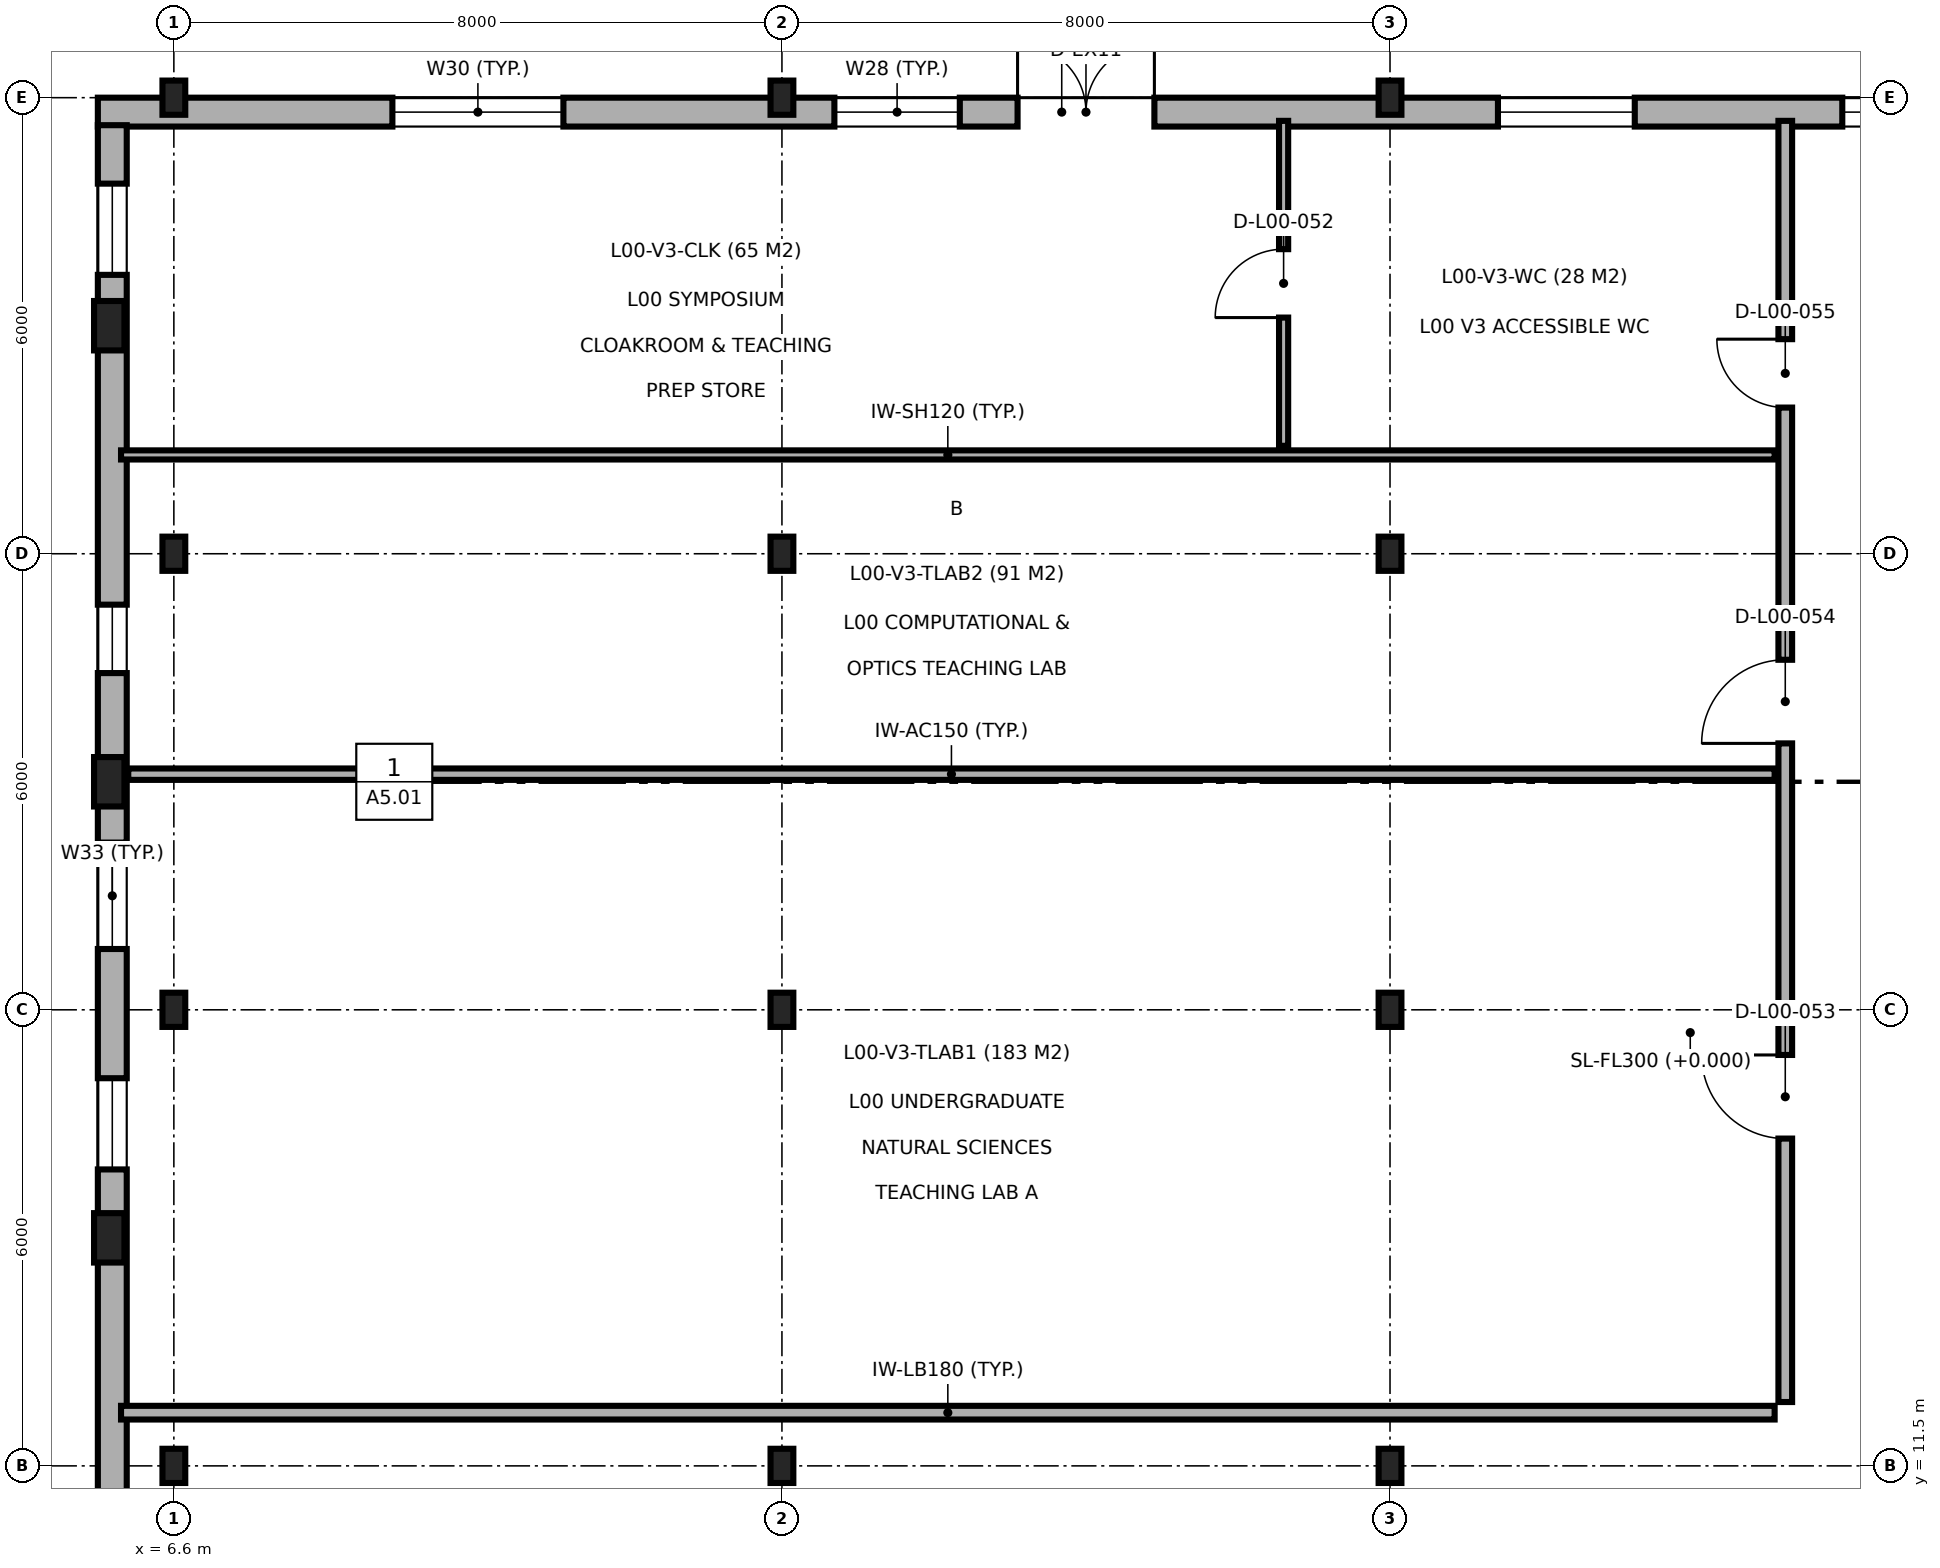
"""IFC4 building model, lengths in metres.
Left out: names, types, materials, properties, quantities, classifications, styles, units other than length and angle.
Written with IfcOpenShell. Run it as: python <this file> out.ifc"""

import sys

from ifc_helpers import new_model, si_unit, direction, frame, frame_2d, origin, origin_2d, place, context, subcontext, project, spatial, rectangle, i_section, extrude, element, fill, save


model = new_model("IFC4")
c1 = context("Model", 3, precision=1e-05, world=origin(), true_north=direction((0.0, 1.0)))
c2 = subcontext(c1, "Body", "Model", "MODEL_VIEW")
j1 = project(units=[si_unit("LENGTHUNIT", "METRE"), si_unit("PLANEANGLEUNIT", "RADIAN")], contexts=[c1])
p1 = place(None, origin())
s1 = spatial("IfcSite", under=j1, at=p1, CompositionType="ELEMENT")
p2 = place(p1, origin())
s2 = spatial("IfcBuilding", under=s1, at=p2, CompositionType="ELEMENT")
p3 = place(p2, origin())
s3 = spatial("IfcBuildingStorey", under=s2, at=p3, CompositionType="ELEMENT", Elevation=0.0)
for number, where, z_axis, x_axis in (
    (1, (5.75, 14.5, 0.0), (0.0, 0.0, 1.0), (1.0, 0.0, 0.0)),
    (2, (5.75, 20.5, 0.0), (0.0, 0.0, 1.0), (1.0, 0.0, 0.0)),
    (3, (5.75, 26.5, 0.0), (0.0, 0.0, 1.0), (1.0, 0.0, 0.0)),
):
    element("IfcColumn", number, at=place(p3, frame(where, z_axis=z_axis, x_axis=x_axis)), inside=s3, PredefinedType="PILASTER", context=c2, shape_type="SweptSolid", body=[
        extrude(rectangle(XDim=0.4, YDim=0.65, at=origin_2d()), origin(), (0.0, 0.0, 1.0), 4.8),
    ])
for number, where, z_axis, x_axis in (
    (4, (6.6, 11.5, 0.0), (0.0, 0.0, 1.0), (1.0, 0.0, 0.0)),
    (5, (6.6, 17.5, 0.0), (0.0, 0.0, 1.0), (1.0, 0.0, 0.0)),
    (6, (6.6, 23.5, 0.0), (0.0, 0.0, 1.0), (1.0, 0.0, 0.0)),
    (7, (6.6, 29.5, 0.0), (0.0, 0.0, 1.0), (1.0, 0.0, 0.0)),
    (8, (14.6, 11.5, 0.0), (0.0, 0.0, 1.0), (1.0, 0.0, 0.0)),
    (9, (14.6, 17.5, 0.0), (0.0, 0.0, 1.0), (1.0, 0.0, 0.0)),
    (10, (14.6, 23.5, 0.0), (0.0, 0.0, 1.0), (1.0, 0.0, 0.0)),
    (11, (14.6, 29.5, 0.0), (0.0, 0.0, 1.0), (1.0, 0.0, 0.0)),
    (12, (22.6, 11.5, 0.0), (0.0, 0.0, 1.0), (1.0, 0.0, 0.0)),
    (13, (22.6, 17.5, 0.0), (0.0, 0.0, 1.0), (1.0, 0.0, 0.0)),
    (14, (22.6, 23.5, 0.0), (0.0, 0.0, 1.0), (1.0, 0.0, 0.0)),
    (15, (22.6, 29.5, 0.0), (0.0, 0.0, 1.0), (1.0, 0.0, 0.0)),
):
    element("IfcColumn", number, at=place(p3, frame(where, z_axis=z_axis, x_axis=x_axis)), inside=s3, PredefinedType="COLUMN", context=c2, shape_type="SweptSolid", body=[
        extrude(i_section(OverallWidth=0.3, OverallDepth=0.45, WebThickness=0.014, FlangeThickness=0.026, FilletRadius=0.027, at=origin_2d()), origin(), (0.0, 0.0, 1.0), 4.8),
    ])
p4 = place(p3, frame((30.962, 29.31, 0.0), z_axis=(0.0, 0.0, 1.0), x_axis=(-1.0, 0.0, 0.0)))
e16 = element("IfcWall", 16, at=p4, inside=s3, PredefinedType="SOLIDWALL", context=c2, shape_type="SweptSolid", body=[
    extrude(rectangle(XDim=25.362, YDim=0.38, at=frame_2d((12.681, 0.0))), origin(), (0.0, 0.0, 1.0), 4.55),
])
p5 = place(p4, frame((11.462, 0.0, 0.0)))
e17 = element("IfcOpeningElement", 17, at=p5, cuts=e16, PredefinedType="OPENING", context=c2, shape_type="SweptSolid", body=[
    extrude(rectangle(XDim=1.8, YDim=2.3, at=frame_2d((0.9, 1.15))), frame((0.0, 0.2, 0.0), z_axis=(0.0, -1.0, 0.0), x_axis=(1.0, 0.0, 0.0)), (0.0, 0.0, 1.0), 0.4),
])
p6 = place(p4, frame((1.512, 0.0, 0.9)))
e18 = element("IfcOpeningElement", 18, at=p6, cuts=e16, PredefinedType="OPENING", context=c2, shape_type="SweptSolid", body=[
    extrude(rectangle(XDim=0.9, YDim=1.8, at=frame_2d((0.45, 0.9))), frame((0.0, 0.2, 0.0), z_axis=(0.0, -1.0, 0.0), x_axis=(1.0, 0.0, 0.0)), (0.0, 0.0, 1.0), 0.4),
])
p7 = place(p4, frame((5.142, 0.0, 0.9)))
e19 = element("IfcOpeningElement", 19, at=p7, cuts=e16, PredefinedType="OPENING", context=c2, shape_type="SweptSolid", body=[
    extrude(rectangle(XDim=1.8, YDim=2.1, at=frame_2d((0.9, 1.05))), frame((0.0, 0.2, 0.0), z_axis=(0.0, -1.0, 0.0), x_axis=(1.0, 0.0, 0.0)), (0.0, 0.0, 1.0), 0.4),
])
p8 = place(p4, frame((14.022, 0.0, 0.9)))
e20 = element("IfcOpeningElement", 20, at=p8, cuts=e16, PredefinedType="OPENING", context=c2, shape_type="SweptSolid", body=[
    extrude(rectangle(XDim=1.65, YDim=1.95, at=frame_2d((0.825, 0.975))), frame((0.0, 0.2, 0.0), z_axis=(0.0, -1.0, 0.0), x_axis=(1.0, 0.0, 0.0)), (0.0, 0.0, 1.0), 0.4),
])
p9 = place(p4, frame((19.237, 0.0, 0.9)))
e21 = element("IfcOpeningElement", 21, at=p9, cuts=e16, PredefinedType="OPENING", context=c2, shape_type="SweptSolid", body=[
    extrude(rectangle(XDim=2.25, YDim=1.95, at=frame_2d((1.125, 0.975))), frame((0.0, 0.2, 0.0), z_axis=(0.0, -1.0, 0.0), x_axis=(1.0, 0.0, 0.0)), (0.0, 0.0, 1.0), 0.4),
])
p10 = place(p3, frame((5.79, 29.138, 0.0), z_axis=(0.0, 0.0, 1.0), x_axis=(0.0, -1.0, 0.0)))
e22 = element("IfcWall", 22, at=p10, inside=s3, PredefinedType="SOLIDWALL", context=c2, shape_type="SweptSolid", body=[
    extrude(rectangle(XDim=24.238, YDim=0.38, at=frame_2d((12.119, 0.0))), origin(), (0.0, 0.0, 1.0), 4.55),
])
p11 = place(p10, frame((0.769, 0.0, 0.9)))
e23 = element("IfcOpeningElement", 23, at=p11, cuts=e22, PredefinedType="OPENING", context=c2, shape_type="SweptSolid", body=[
    extrude(rectangle(XDim=1.2, YDim=1.8, at=frame_2d((0.6, 0.9))), frame((0.0, 0.2, 0.0), z_axis=(0.0, -1.0, 0.0), x_axis=(1.0, 0.0, 0.0)), (0.0, 0.0, 1.0), 0.4),
])
p12 = place(p10, frame((6.308, 0.0, 0.9)))
e24 = element("IfcOpeningElement", 24, at=p12, cuts=e22, PredefinedType="OPENING", context=c2, shape_type="SweptSolid", body=[
    extrude(rectangle(XDim=0.9, YDim=1.8, at=frame_2d((0.45, 0.9))), frame((0.0, 0.2, 0.0), z_axis=(0.0, -1.0, 0.0), x_axis=(1.0, 0.0, 0.0)), (0.0, 0.0, 1.0), 0.4),
])
p13 = place(p10, frame((9.438, 0.0, 0.9)))
e25 = element("IfcOpeningElement", 25, at=p13, cuts=e22, PredefinedType="OPENING", context=c2, shape_type="SweptSolid", body=[
    extrude(rectangle(XDim=1.4, YDim=1.65, at=frame_2d((0.7, 0.825))), frame((0.0, 0.2, 0.0), z_axis=(0.0, -1.0, 0.0), x_axis=(1.0, 0.0, 0.0)), (0.0, 0.0, 1.0), 0.4),
])
p14 = place(p10, frame((12.538, 0.0, 0.9)))
e26 = element("IfcOpeningElement", 26, at=p14, cuts=e22, PredefinedType="OPENING", context=c2, shape_type="SweptSolid", body=[
    extrude(rectangle(XDim=1.2, YDim=1.8, at=frame_2d((0.6, 0.9))), frame((0.0, 0.2, 0.0), z_axis=(0.0, -1.0, 0.0), x_axis=(1.0, 0.0, 0.0)), (0.0, 0.0, 1.0), 0.4),
])
p15 = place(p10, frame((18.538, 0.0, 0.9)))
e27 = element("IfcOpeningElement", 27, at=p15, cuts=e22, PredefinedType="OPENING", context=c2, shape_type="SweptSolid", body=[
    extrude(rectangle(XDim=1.2, YDim=1.8, at=frame_2d((0.6, 0.9))), frame((0.0, 0.2, 0.0), z_axis=(0.0, -1.0, 0.0), x_axis=(1.0, 0.0, 0.0)), (0.0, 0.0, 1.0), 0.4),
])
p16 = place(p10, frame((21.528, 0.0, 0.9)))
e28 = element("IfcOpeningElement", 28, at=p16, cuts=e22, PredefinedType="OPENING", context=c2, shape_type="SweptSolid", body=[
    extrude(rectangle(XDim=1.2, YDim=1.8, at=frame_2d((0.6, 0.9))), frame((0.0, 0.2, 0.0), z_axis=(0.0, -1.0, 0.0), x_axis=(1.0, 0.0, 0.0)), (0.0, 0.0, 1.0), 0.4),
])
p17 = place(p3, frame((5.905, 12.2, 0.0), z_axis=(0.0, 0.0, 1.0), x_axis=(1.0, 0.0, 0.0)))
e29 = element("IfcWall", 29, at=p17, inside=s3, PredefinedType="PARTITIONING", context=c2, shape_type="SweptSolid", body=[
    extrude(rectangle(XDim=21.755, YDim=0.18, at=frame_2d((10.877, 0.0))), origin(), (0.0, 0.0, 1.0), 4.55),
])
p18 = place(p3, frame((6.0, 20.6, 0.0), z_axis=(0.0, 0.0, 1.0), x_axis=(1.0, 0.0, 0.0)))
e30 = element("IfcWall", 30, at=p18, inside=s3, PredefinedType="PARTITIONING", context=c2, shape_type="SweptSolid", body=[
    extrude(rectangle(XDim=21.66, YDim=0.15, at=frame_2d((10.83, 0.0))), origin(), (0.0, 0.0, 1.0), 4.55),
])
p19 = place(p3, frame((5.905, 24.8, 0.0), z_axis=(0.0, 0.0, 1.0), x_axis=(1.0, 0.0, 0.0)))
e31 = element("IfcWall", 31, at=p19, inside=s3, PredefinedType="PARTITIONING", context=c2, shape_type="SweptSolid", body=[
    extrude(rectangle(XDim=21.755, YDim=0.12, at=frame_2d((10.877, 0.0))), origin(), (0.0, 0.0, 1.0), 4.55),
])
p20 = place(p3, frame((21.2, 24.92, 0.0), z_axis=(0.0, 0.0, 1.0), x_axis=(0.0, 1.0, 0.0)))
e32 = element("IfcWall", 32, at=p20, inside=s3, PredefinedType="PARTITIONING", context=c2, shape_type="SweptSolid", body=[
    extrude(rectangle(XDim=4.275, YDim=0.12, at=frame_2d((2.138, 0.0))), origin(), (0.0, 0.0, 1.0), 4.55),
])
p21 = place(p20, frame((1.687, 0.0, 0.0)))
e33 = element("IfcOpeningElement", 33, at=p21, cuts=e32, PredefinedType="OPENING", context=c2, shape_type="SweptSolid", body=[
    extrude(rectangle(XDim=0.9, YDim=2.1, at=frame_2d((0.45, 1.05))), frame((0.0, 0.07, 0.0), z_axis=(0.0, -1.0, 0.0), x_axis=(1.0, 0.0, 0.0)), (0.0, 0.0, 1.0), 0.14),
])
p22 = place(p3, frame((27.8, 12.34, 0.0), z_axis=(0.0, 0.0, 1.0), x_axis=(0.0, 1.0, 0.0)))
e34 = element("IfcWall", 34, at=p22, inside=s3, PredefinedType="PARTITIONING", context=c2, shape_type="SweptSolid", body=[
    extrude(rectangle(XDim=16.855, YDim=0.18, at=frame_2d((8.427, 0.0))), origin(), (0.0, 0.0, 1.0), 4.31),
])
p23 = place(p22, frame((3.466, 0.0, 0.0)))
e35 = element("IfcOpeningElement", 35, at=p23, cuts=e34, PredefinedType="OPENING", context=c2, shape_type="SweptSolid", body=[
    extrude(rectangle(XDim=1.1, YDim=2.15, at=frame_2d((0.55, 1.075))), frame((0.0, 0.1, 0.0), z_axis=(0.0, -1.0, 0.0), x_axis=(1.0, 0.0, 0.0)), (0.0, 0.0, 1.0), 0.2),
])
p24 = place(p22, frame((8.665, 0.0, 0.0)))
e36 = element("IfcOpeningElement", 36, at=p24, cuts=e34, PredefinedType="OPENING", context=c2, shape_type="SweptSolid", body=[
    extrude(rectangle(XDim=1.1, YDim=2.15, at=frame_2d((0.55, 1.075))), frame((0.0, 0.1, 0.0), z_axis=(0.0, -1.0, 0.0), x_axis=(1.0, 0.0, 0.0)), (0.0, 0.0, 1.0), 0.2),
])
p25 = place(p22, frame((13.083, 0.0, 0.0)))
e37 = element("IfcOpeningElement", 37, at=p25, cuts=e34, PredefinedType="OPENING", context=c2, shape_type="SweptSolid", body=[
    extrude(rectangle(XDim=0.9, YDim=2.1, at=frame_2d((0.45, 1.05))), frame((0.0, 0.1, 0.0), z_axis=(0.0, -1.0, 0.0), x_axis=(1.0, 0.0, 0.0)), (0.0, 0.0, 1.0), 0.2),
])
p26 = place(p5, frame((1.8, 0.0, 0.0), z_axis=(0.0, 0.0, 1.0), x_axis=(-1.0, 0.0, 0.0)))
e38 = element("IfcDoor", 38, at=p26, inside=s3, OperationType="DOUBLE_DOOR_SINGLE_SWING", PredefinedType="DOOR", context=c2, shape_type="SweptSolid", body=[
    extrude(rectangle(XDim=1.8, YDim=2.3, at=frame_2d((0.9, 1.15))), frame((0.0, 0.025, 0.0), z_axis=(0.0, -1.0, 0.0), x_axis=(1.0, 0.0, 0.0)), (0.0, 0.0, 1.0), 0.05),
])
fill(e17, e38)
p27 = place(p6, origin())
e39 = element("IfcWindow", 39, at=p27, inside=s3, PartitioningType="SINGLE_PANEL", PredefinedType="WINDOW", context=c2, shape_type="SweptSolid", body=[
    extrude(rectangle(XDim=0.9, YDim=1.8, at=frame_2d((0.45, 0.9))), frame((0.0, 0.03, 0.0), z_axis=(0.0, -1.0, 0.0), x_axis=(1.0, 0.0, 0.0)), (0.0, 0.0, 1.0), 0.06),
])
fill(e18, e39)
p28 = place(p7, origin())
e40 = element("IfcWindow", 40, at=p28, inside=s3, PartitioningType="SINGLE_PANEL", PredefinedType="WINDOW", context=c2, shape_type="SweptSolid", body=[
    extrude(rectangle(XDim=1.8, YDim=2.1, at=frame_2d((0.9, 1.05))), frame((0.0, 0.03, 0.0), z_axis=(0.0, -1.0, 0.0), x_axis=(1.0, 0.0, 0.0)), (0.0, 0.0, 1.0), 0.06),
])
fill(e19, e40)
p29 = place(p8, origin())
e41 = element("IfcWindow", 41, at=p29, inside=s3, PartitioningType="SINGLE_PANEL", PredefinedType="WINDOW", context=c2, shape_type="SweptSolid", body=[
    extrude(rectangle(XDim=1.65, YDim=1.95, at=frame_2d((0.825, 0.975))), frame((0.0, 0.03, 0.0), z_axis=(0.0, -1.0, 0.0), x_axis=(1.0, 0.0, 0.0)), (0.0, 0.0, 1.0), 0.06),
])
fill(e20, e41)
p30 = place(p9, origin())
e42 = element("IfcWindow", 42, at=p30, inside=s3, PartitioningType="SINGLE_PANEL", PredefinedType="WINDOW", context=c2, shape_type="SweptSolid", body=[
    extrude(rectangle(XDim=2.25, YDim=1.95, at=frame_2d((1.125, 0.975))), frame((0.0, 0.03, 0.0), z_axis=(0.0, -1.0, 0.0), x_axis=(1.0, 0.0, 0.0)), (0.0, 0.0, 1.0), 0.06),
])
fill(e21, e42)
p31 = place(p11, origin())
e43 = element("IfcWindow", 43, at=p31, inside=s3, PartitioningType="SINGLE_PANEL", PredefinedType="WINDOW", context=c2, shape_type="SweptSolid", body=[
    extrude(rectangle(XDim=1.2, YDim=1.8, at=frame_2d((0.6, 0.9))), frame((0.0, 0.03, 0.0), z_axis=(0.0, -1.0, 0.0), x_axis=(1.0, 0.0, 0.0)), (0.0, 0.0, 1.0), 0.06),
])
fill(e23, e43)
p32 = place(p12, origin())
e44 = element("IfcWindow", 44, at=p32, inside=s3, PartitioningType="SINGLE_PANEL", PredefinedType="WINDOW", context=c2, shape_type="SweptSolid", body=[
    extrude(rectangle(XDim=0.9, YDim=1.8, at=frame_2d((0.45, 0.9))), frame((0.0, 0.03, 0.0), z_axis=(0.0, -1.0, 0.0), x_axis=(1.0, 0.0, 0.0)), (0.0, 0.0, 1.0), 0.06),
])
fill(e24, e44)
p33 = place(p13, origin())
e45 = element("IfcWindow", 45, at=p33, inside=s3, PartitioningType="SINGLE_PANEL", PredefinedType="WINDOW", context=c2, shape_type="SweptSolid", body=[
    extrude(rectangle(XDim=1.4, YDim=1.65, at=frame_2d((0.7, 0.825))), frame((0.0, 0.03, 0.0), z_axis=(0.0, -1.0, 0.0), x_axis=(1.0, 0.0, 0.0)), (0.0, 0.0, 1.0), 0.06),
])
fill(e25, e45)
p34 = place(p14, origin())
e46 = element("IfcWindow", 46, at=p34, inside=s3, PartitioningType="SINGLE_PANEL", PredefinedType="WINDOW", context=c2, shape_type="SweptSolid", body=[
    extrude(rectangle(XDim=1.2, YDim=1.8, at=frame_2d((0.6, 0.9))), frame((0.0, 0.03, 0.0), z_axis=(0.0, -1.0, 0.0), x_axis=(1.0, 0.0, 0.0)), (0.0, 0.0, 1.0), 0.06),
])
fill(e26, e46)
p35 = place(p21, origin())
e47 = element("IfcDoor", 47, at=p35, inside=s3, OperationType="SINGLE_SWING_LEFT", PredefinedType="DOOR", context=c2, shape_type="SweptSolid", body=[
    extrude(rectangle(XDim=0.9, YDim=2.1, at=frame_2d((0.45, 1.05))), frame((0.0, 0.025, 0.0), z_axis=(0.0, -1.0, 0.0), x_axis=(1.0, 0.0, 0.0)), (0.0, 0.0, 1.0), 0.05),
])
fill(e33, e47)
p36 = place(p23, origin())
e48 = element("IfcDoor", 48, at=p36, inside=s3, OperationType="SINGLE_SWING_RIGHT", PredefinedType="DOOR", context=c2, shape_type="SweptSolid", body=[
    extrude(rectangle(XDim=1.1, YDim=2.15, at=frame_2d((0.55, 1.075))), frame((0.0, 0.025, 0.0), z_axis=(0.0, -1.0, 0.0), x_axis=(1.0, 0.0, 0.0)), (0.0, 0.0, 1.0), 0.05),
])
fill(e35, e48)
p37 = place(p24, origin())
e49 = element("IfcDoor", 49, at=p37, inside=s3, OperationType="SINGLE_SWING_LEFT", PredefinedType="DOOR", context=c2, shape_type="SweptSolid", body=[
    extrude(rectangle(XDim=1.1, YDim=2.15, at=frame_2d((0.55, 1.075))), frame((0.0, 0.025, 0.0), z_axis=(0.0, -1.0, 0.0), x_axis=(1.0, 0.0, 0.0)), (0.0, 0.0, 1.0), 0.05),
])
fill(e36, e49)
p38 = place(p25, origin())
e50 = element("IfcDoor", 50, at=p38, inside=s3, OperationType="SINGLE_SWING_RIGHT", PredefinedType="DOOR", context=c2, shape_type="SweptSolid", body=[
    extrude(rectangle(XDim=0.9, YDim=2.1, at=frame_2d((0.45, 1.05))), frame((0.0, 0.025, 0.0), z_axis=(0.0, -1.0, 0.0), x_axis=(1.0, 0.0, 0.0)), (0.0, 0.0, 1.0), 0.05),
])
fill(e37, e50)
save(model, sys.argv[1])
